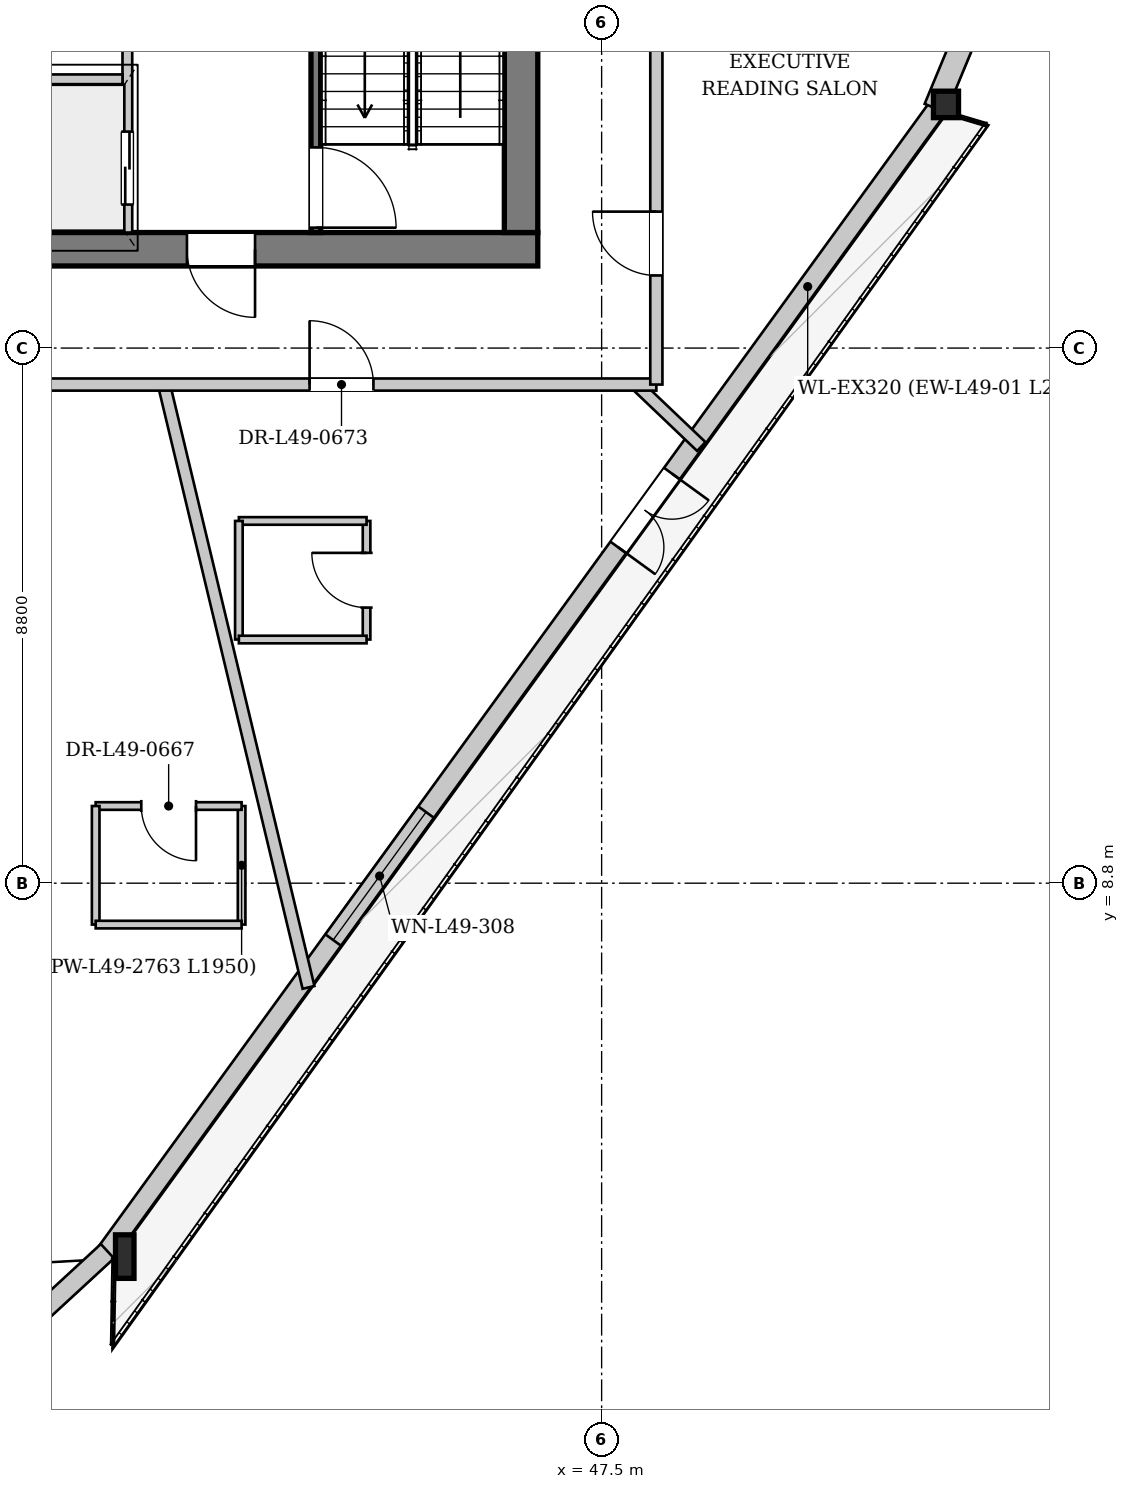
"""IFC4 building model, lengths in metres.
Left out: names, types, materials, properties, quantities, classifications, styles, units other than length and angle.
Written with IfcOpenShell. Run it as: python <this file> out.ifc"""

import sys

from ifc_helpers import new_model, si_unit, direction, frame, frame_2d, origin, origin_2d, place, context, subcontext, project, spatial, rectangle, i_section, extrude, source, transform, mapped, element, fill, save


model = new_model("IFC4")
c1 = context("Model", 3, precision=1e-05, world=origin(), true_north=direction((0.0, 1.0)))
c2 = subcontext(c1, "Body", "Model", "MODEL_VIEW")
j1 = project(units=[si_unit("LENGTHUNIT", "METRE"), si_unit("PLANEANGLEUNIT", "RADIAN")], contexts=[c1])
p1 = place(None, origin())
s1 = spatial("IfcSite", under=j1, at=p1, CompositionType="ELEMENT")
p2 = place(p1, origin())
s2 = spatial("IfcBuilding", under=s1, at=p2, CompositionType="ELEMENT")
p3 = place(p2, frame((0.0, 0.0, 185.65)))
s3 = spatial("IfcBuildingStorey", under=s2, at=p3, CompositionType="ELEMENT", Elevation=185.65)
m1 = source(origin(), c2, "Body", "SweptSolid", [
    extrude(i_section(OverallWidth=0.304, OverallDepth=0.716, WebThickness=0.021, FlangeThickness=0.04, at=origin_2d()), origin(), (0.0, 0.0, 1.0), 3.404),
])
p4 = place(p3, frame((39.48, 2.63, 0.0), z_axis=(0.103926658279, 0.016998356116, 0.994439694294), x_axis=(-0.161416205557, 0.986886421319, 0.0)))
e1 = element("IfcColumn", 1, at=p4, inside=s3, PredefinedType="COLUMN", context=c2, shape_type="MappedRepresentation", body=[
    mapped(m1, transform((0.0, 0.0, 0.0), x_axis=(1.0, 0.0, 0.0), y_axis=(0.0, 1.0, 0.0), z_axis=(0.0, 0.0, 1.0), scale=1.0)),
])
m2 = source(origin(), c2, "Body", "SweptSolid", [
    extrude(i_section(OverallWidth=0.412, OverallDepth=0.435, WebThickness=0.031, FlangeThickness=0.05, at=origin_2d()), origin(), (0.0, 0.0, 1.0), 3.396),
])
p5 = place(p3, frame((53.164, 21.471, 0.0), z_axis=(0.0, 0.080230966511, 0.996776299885), x_axis=(-1.0, 0.0, 0.0)))
e2 = element("IfcColumn", 2, at=p5, inside=s3, PredefinedType="COLUMN", context=c2, shape_type="MappedRepresentation", body=[
    mapped(m2, transform((0.0, 0.0, 0.0), x_axis=(1.0, 0.0, 0.0), y_axis=(0.0, 1.0, 0.0), z_axis=(0.0, 0.0, 1.0), scale=1.0)),
])
p6 = place(p3, frame((53.034, 21.565, 0.0), z_axis=(0.0, 0.0, 1.0), x_axis=(-0.58764790483, -0.809116765337, 0.0)))
e3 = element("IfcWall", 3, at=p6, inside=s3, PredefinedType="SOLIDWALL", context=c2, shape_type="SweptSolid", body=[
    extrude(rectangle(XDim=23.285, YDim=0.32, at=frame_2d((11.643, 0.0))), origin(), (0.0, 0.0, 1.0), 2.722),
])
p7 = place(p6, frame((7.451, 0.0, 0.0)))
e4 = element("IfcOpeningElement", 4, at=p7, cuts=e3, PredefinedType="OPENING", context=c2, shape_type="SweptSolid", body=[
    extrude(rectangle(XDim=1.5, YDim=2.3, at=frame_2d((0.75, 1.15))), frame((0.0, 0.17, 0.0), z_axis=(0.0, -1.0, 0.0), x_axis=(1.0, 0.0, 0.0)), (0.0, 0.0, 1.0), 0.34),
])
p8 = place(p6, frame((14.331, 0.0, 0.252)))
e5 = element("IfcOpeningElement", 5, at=p8, cuts=e3, PredefinedType="OPENING", context=c2, shape_type="SweptSolid", body=[
    extrude(rectangle(XDim=2.6, YDim=2.35, at=frame_2d((1.3, 1.175))), frame((0.0, 0.17, 0.0), z_axis=(0.0, -1.0, 0.0), x_axis=(1.0, 0.0, 0.0)), (0.0, 0.0, 1.0), 0.34),
])
p9 = place(p3, frame((39.372, 2.748, 0.0), z_axis=(0.0, 0.0, 1.0), x_axis=(-0.735229650834, -0.677818088084, 0.0)))
e6 = element("IfcWall", 6, at=p9, inside=s3, PredefinedType="SOLIDWALL", context=c2, shape_type="SweptSolid", body=[
    extrude(rectangle(XDim=2.7, YDim=0.32, at=frame_2d((1.35, 0.0))), origin(), (0.0, 0.0, 1.0), 2.722),
])
p10 = place(p3, frame((61.903, 43.055, 0.0), z_axis=(0.0, 0.0, 1.0), x_axis=(-0.382868163496, -0.923802992732, 0.0)))
e7 = element("IfcWall", 7, at=p10, inside=s3, PredefinedType="SOLIDWALL", context=c2, shape_type="SweptSolid", body=[
    extrude(rectangle(XDim=23.285, YDim=0.38, at=frame_2d((11.643, 0.0))), origin(), (0.0, 0.0, 1.0), 2.722),
])
p11 = place(p10, frame((5.42, 0.0, 0.352)))
e8 = element("IfcOpeningElement", 8, at=p11, cuts=e7, PredefinedType="OPENING", context=c2, shape_type="SweptSolid", body=[
    extrude(rectangle(XDim=2.2, YDim=2.25, at=frame_2d((1.1, 1.125))), frame((0.0, 0.2, 0.0), z_axis=(0.0, -1.0, 0.0), x_axis=(1.0, 0.0, 0.0)), (0.0, 0.0, 1.0), 0.4),
])
p12 = place(p10, frame((15.665, 0.0, 0.352)))
e9 = element("IfcOpeningElement", 9, at=p12, cuts=e7, PredefinedType="OPENING", context=c2, shape_type="SweptSolid", body=[
    extrude(rectangle(XDim=2.2, YDim=2.25, at=frame_2d((1.1, 1.125))), frame((0.0, 0.2, 0.0), z_axis=(0.0, -1.0, 0.0), x_axis=(1.0, 0.0, 0.0)), (0.0, 0.0, 1.0), 0.4),
])
p13 = place(p3, frame((46.45, 19.225, 0.0), z_axis=(0.0, 0.0, 1.0), x_axis=(-1.0, 0.0, 0.0)))
e10 = element("IfcWall", 10, at=p13, inside=s3, PredefinedType="SHEAR", context=c2, shape_type="SweptSolid", body=[
    extrude(rectangle(XDim=16.9, YDim=0.55, at=frame_2d((8.45, 0.0))), origin(), (0.0, 0.0, 1.0), 3.33),
])
p14 = place(p13, frame((4.65, 0.0, 0.0)))
e11 = element("IfcOpeningElement", 11, at=p14, cuts=e10, PredefinedType="OPENING", context=c2, shape_type="SweptSolid", body=[
    extrude(rectangle(XDim=1.12, YDim=2.25, at=frame_2d((0.56, 1.125))), frame((0.0, 0.285, 0.0), z_axis=(0.0, -1.0, 0.0), x_axis=(1.0, 0.0, 0.0)), (0.0, 0.0, 1.0), 0.57),
])
p15 = place(p13, frame((11.15, 0.0, 0.0)))
e12 = element("IfcOpeningElement", 12, at=p15, cuts=e10, PredefinedType="OPENING", context=c2, shape_type="SweptSolid", body=[
    extrude(rectangle(XDim=1.12, YDim=2.25, at=frame_2d((0.56, 1.125))), frame((0.0, 0.285, 0.0), z_axis=(0.0, -1.0, 0.0), x_axis=(1.0, 0.0, 0.0)), (0.0, 0.0, 1.0), 0.57),
])
p16 = place(p3, frame((46.175, 33.7, 0.0), z_axis=(0.0, 0.0, 1.0), x_axis=(0.0, -1.0, 0.0)))
e13 = element("IfcWall", 13, at=p16, inside=s3, PredefinedType="SHEAR", context=c2, shape_type="SweptSolid", body=[
    extrude(rectangle(XDim=14.2, YDim=0.55, at=frame_2d((7.1, 0.0))), origin(), (0.0, 0.0, 1.0), 3.33),
])
p17 = place(p16, frame((5.18, 0.0, 0.0)))
e14 = element("IfcOpeningElement", 14, at=p17, cuts=e13, PredefinedType="OPENING", context=c2, shape_type="SweptSolid", body=[
    extrude(rectangle(XDim=1.6, YDim=2.2, at=frame_2d((0.8, 1.1))), frame((0.0, 0.285, 0.0), z_axis=(0.0, -1.0, 0.0), x_axis=(1.0, 0.0, 0.0)), (0.0, 0.0, 1.0), 0.57),
])
p18 = place(p16, frame((2.05, 0.0, 0.0)))
e15 = element("IfcOpeningElement", 15, at=p18, cuts=e13, PredefinedType="OPENING", context=c2, shape_type="SweptSolid", body=[
    extrude(rectangle(XDim=0.95, YDim=2.1, at=frame_2d((0.475, 1.05))), frame((0.0, 0.285, 0.0), z_axis=(0.0, -1.0, 0.0), x_axis=(1.0, 0.0, 0.0)), (0.0, 0.0, 1.0), 0.57),
])
p19 = place(p3, frame((42.8, 26.96, 0.0), z_axis=(0.0, 0.0, 1.0), x_axis=(0.0, -1.0, 0.0)))
e16 = element("IfcWall", 16, at=p19, inside=s3, PredefinedType="PARTITIONING", context=c2, shape_type="SweptSolid", body=[
    extrude(rectangle(XDim=7.46, YDim=0.16, at=frame_2d((3.73, 0.0))), origin(), (0.0, 0.0, 1.0), 3.33),
])
p20 = place(p19, frame((6.06, 0.0, 0.0)))
e17 = element("IfcOpeningElement", 17, at=p20, cuts=e16, PredefinedType="OPENING", context=c2, shape_type="SweptSolid", body=[
    extrude(rectangle(XDim=1.32, YDim=2.2, at=frame_2d((0.66, 1.1))), frame((0.0, 0.09, 0.0), z_axis=(0.0, -1.0, 0.0), x_axis=(1.0, 0.0, 0.0)), (0.0, 0.0, 1.0), 0.18),
])
p21 = place(p3, frame((39.7, 24.28, 0.0), z_axis=(0.0, 0.0, 1.0), x_axis=(0.0, -1.0, 0.0)))
e18 = element("IfcWall", 18, at=p21, inside=s3, PredefinedType="PARTITIONING", context=c2, shape_type="SweptSolid", body=[
    extrude(rectangle(XDim=4.78, YDim=0.16, at=frame_2d((2.39, 0.0))), origin(), (0.0, 0.0, 1.0), 3.33),
])
p22 = place(p21, frame((3.12, 0.0, 0.0)))
e19 = element("IfcOpeningElement", 19, at=p22, cuts=e18, PredefinedType="OPENING", context=c2, shape_type="SweptSolid", body=[
    extrude(rectangle(XDim=1.2, YDim=2.2, at=frame_2d((0.6, 1.1))), frame((0.0, 0.09, 0.0), z_axis=(0.0, -1.0, 0.0), x_axis=(1.0, 0.0, 0.0)), (0.0, 0.0, 1.0), 0.18),
])
p23 = place(p3, frame((36.38, 22.02, 0.0), z_axis=(0.0, 0.0, 1.0), x_axis=(1.0, 0.0, 0.0)))
e20 = element("IfcWall", 20, at=p23, inside=s3, PredefinedType="PARTITIONING", context=c2, shape_type="SweptSolid", body=[
    extrude(rectangle(XDim=3.24, YDim=0.16, at=frame_2d((1.62, 0.0))), origin(), (0.0, 0.0, 1.0), 3.33),
])
p24 = place(p3, frame((40.302, 17.0, 0.0), z_axis=(0.0, 0.0, 1.0), x_axis=(0.233176404648, -0.972434452452, 0.0)))
e21 = element("IfcWall", 21, at=p24, inside=s3, PredefinedType="PARTITIONING", context=c2, shape_type="SweptSolid", body=[
    extrude(rectangle(XDim=10.195, YDim=0.2, at=frame_2d((5.097, 0.0))), origin(), (0.0, 0.0, 1.0), 3.33),
])
p25 = place(p3, frame((48.07, 17.0, 0.0), z_axis=(0.0, 0.0, 1.0), x_axis=(0.723764420098, -0.69004714636, 0.0)))
e22 = element("IfcWall", 22, at=p25, inside=s3, PredefinedType="PARTITIONING", context=c2, shape_type="SweptSolid", body=[
    extrude(rectangle(XDim=1.477, YDim=0.2, at=frame_2d((0.739, 0.0))), origin(), (0.0, 0.0, 1.0), 3.33),
])
p26 = place(p3, frame((41.579, 8.119, 0.0), z_axis=(0.0, 0.0, 1.0), x_axis=(0.0, 1.0, 0.0)))
e23 = element("IfcWall", 23, at=p26, inside=s3, PredefinedType="PARTITIONING", context=c2, shape_type="SweptSolid", body=[
    extrude(rectangle(XDim=1.95, YDim=0.125, at=frame_2d((0.975, 0.0))), origin(), (0.0, 0.0, 1.0), 3.33),
])
p27 = place(p3, frame((41.579, 10.069, 0.0), z_axis=(0.0, 0.0, 1.0), x_axis=(-1.0, 0.0, 0.0)))
e24 = element("IfcWall", 24, at=p27, inside=s3, PredefinedType="PARTITIONING", context=c2, shape_type="SweptSolid", body=[
    extrude(rectangle(XDim=2.4, YDim=0.125, at=frame_2d((1.2, 0.0))), origin(), (0.0, 0.0, 1.0), 3.33),
])
p28 = place(p27, frame((0.75, 0.0, 0.0)))
e25 = element("IfcOpeningElement", 25, at=p28, cuts=e24, PredefinedType="OPENING", context=c2, shape_type="SweptSolid", body=[
    extrude(rectangle(XDim=0.9, YDim=2.1, at=frame_2d((0.45, 1.05))), frame((0.0, 0.073, 0.0), z_axis=(0.0, -1.0, 0.0), x_axis=(1.0, 0.0, 0.0)), (0.0, 0.0, 1.0), 0.145),
])
p29 = place(p3, frame((39.179, 10.069, 0.0), z_axis=(0.0, 0.0, 1.0), x_axis=(0.0, -1.0, 0.0)))
e26 = element("IfcWall", 26, at=p29, inside=s3, PredefinedType="PARTITIONING", context=c2, shape_type="SweptSolid", body=[
    extrude(rectangle(XDim=1.95, YDim=0.125, at=frame_2d((0.975, 0.0))), origin(), (0.0, 0.0, 1.0), 3.005),
])
p30 = place(p3, frame((39.179, 8.119, 0.0), z_axis=(0.0, 0.0, 1.0), x_axis=(1.0, 0.0, 0.0)))
e27 = element("IfcWall", 27, at=p30, inside=s3, PredefinedType="PARTITIONING", context=c2, shape_type="SweptSolid", body=[
    extrude(rectangle(XDim=2.4, YDim=0.125, at=frame_2d((1.2, 0.0))), origin(), (0.0, 0.0, 1.0), 3.33),
])
p31 = place(p3, frame((43.634, 12.807, 0.0), z_axis=(0.0, 0.0, 1.0), x_axis=(0.0, 1.0, 0.0)))
e28 = element("IfcWall", 28, at=p31, inside=s3, PredefinedType="PARTITIONING", context=c2, shape_type="SweptSolid", body=[
    extrude(rectangle(XDim=1.95, YDim=0.125, at=frame_2d((0.975, 0.0))), origin(), (0.0, 0.0, 1.0), 3.33),
])
p32 = place(p31, frame((0.525, 0.0, 0.0)))
e29 = element("IfcOpeningElement", 29, at=p32, cuts=e28, PredefinedType="OPENING", context=c2, shape_type="SweptSolid", body=[
    extrude(rectangle(XDim=0.9, YDim=2.1, at=frame_2d((0.45, 1.05))), frame((0.0, 0.073, 0.0), z_axis=(0.0, -1.0, 0.0), x_axis=(1.0, 0.0, 0.0)), (0.0, 0.0, 1.0), 0.145),
])
p33 = place(p3, frame((43.634, 14.757, 0.0), z_axis=(0.0, 0.0, 1.0), x_axis=(-1.0, 0.0, 0.0)))
e30 = element("IfcWall", 30, at=p33, inside=s3, PredefinedType="PARTITIONING", context=c2, shape_type="SweptSolid", body=[
    extrude(rectangle(XDim=2.1, YDim=0.125, at=frame_2d((1.05, 0.0))), origin(), (0.0, 0.0, 1.0), 3.33),
])
p34 = place(p3, frame((41.534, 14.757, 0.0), z_axis=(0.0, 0.0, 1.0), x_axis=(0.0, -1.0, 0.0)))
e31 = element("IfcWall", 31, at=p34, inside=s3, PredefinedType="PARTITIONING", context=c2, shape_type="SweptSolid", body=[
    extrude(rectangle(XDim=1.95, YDim=0.125, at=frame_2d((0.975, 0.0))), origin(), (0.0, 0.0, 1.0), 3.33),
])
p35 = place(p3, frame((41.534, 12.807, 0.0), z_axis=(0.0, 0.0, 1.0), x_axis=(1.0, 0.0, 0.0)))
e32 = element("IfcWall", 32, at=p35, inside=s3, PredefinedType="PARTITIONING", context=c2, shape_type="SweptSolid", body=[
    extrude(rectangle(XDim=2.1, YDim=0.125, at=frame_2d((1.05, 0.0))), origin(), (0.0, 0.0, 1.0), 3.33),
])
p36 = place(p3, frame((27.6, 17.0, 0.0), z_axis=(0.0, 0.0, 1.0), x_axis=(1.0, 0.0, 0.0)))
e33 = element("IfcWall", 33, at=p36, inside=s3, PredefinedType="PARTITIONING", context=c2, shape_type="SweptSolid", body=[
    extrude(rectangle(XDim=20.8, YDim=0.2, at=frame_2d((10.4, 0.0))), origin(), (0.0, 0.0, 1.0), 3.33),
])
p37 = place(p36, frame((8.292, 0.0, 0.0)))
e34 = element("IfcOpeningElement", 34, at=p37, cuts=e33, PredefinedType="OPENING", context=c2, shape_type="SweptSolid", body=[
    extrude(rectangle(XDim=1.05, YDim=2.2, at=frame_2d((0.525, 1.1))), frame((0.0, 0.11, 0.0), z_axis=(0.0, -1.0, 0.0), x_axis=(1.0, 0.0, 0.0)), (0.0, 0.0, 1.0), 0.22),
])
p38 = place(p36, frame((15.097, 0.0, 0.0)))
e35 = element("IfcOpeningElement", 35, at=p38, cuts=e33, PredefinedType="OPENING", context=c2, shape_type="SweptSolid", body=[
    extrude(rectangle(XDim=1.05, YDim=2.2, at=frame_2d((0.525, 1.1))), frame((0.0, 0.11, 0.0), z_axis=(0.0, -1.0, 0.0), x_axis=(1.0, 0.0, 0.0)), (0.0, 0.0, 1.0), 0.22),
])
p39 = place(p36, frame((1.25, 0.0, 0.0)))
e36 = element("IfcOpeningElement", 36, at=p39, cuts=e33, PredefinedType="OPENING", context=c2, shape_type="SweptSolid", body=[
    extrude(rectangle(XDim=1.05, YDim=2.2, at=frame_2d((0.525, 1.1))), frame((0.0, 0.11, 0.0), z_axis=(0.0, -1.0, 0.0), x_axis=(1.0, 0.0, 0.0)), (0.0, 0.0, 1.0), 0.22),
])
p40 = place(p3, frame((48.4, 17.0, 0.0), z_axis=(0.0, 0.0, 1.0), x_axis=(0.0, 1.0, 0.0)))
e37 = element("IfcWall", 37, at=p40, inside=s3, PredefinedType="PARTITIONING", context=c2, shape_type="SweptSolid", body=[
    extrude(rectangle(XDim=19.2, YDim=0.2, at=frame_2d((9.6, 0.0))), origin(), (0.0, 0.0, 1.0), 3.33),
])
p41 = place(p40, frame((1.794, 0.0, 0.0)))
e38 = element("IfcOpeningElement", 38, at=p41, cuts=e37, PredefinedType="OPENING", context=c2, shape_type="SweptSolid", body=[
    extrude(rectangle(XDim=1.05, YDim=2.2, at=frame_2d((0.525, 1.1))), frame((0.0, 0.11, 0.0), z_axis=(0.0, -1.0, 0.0), x_axis=(1.0, 0.0, 0.0)), (0.0, 0.0, 1.0), 0.22),
])
p42 = place(p40, frame((9.465, 0.0, 0.0)))
e39 = element("IfcOpeningElement", 39, at=p42, cuts=e37, PredefinedType="OPENING", context=c2, shape_type="SweptSolid", body=[
    extrude(rectangle(XDim=1.05, YDim=2.2, at=frame_2d((0.525, 1.1))), frame((0.0, 0.11, 0.0), z_axis=(0.0, -1.0, 0.0), x_axis=(1.0, 0.0, 0.0)), (0.0, 0.0, 1.0), 0.22),
])
m3 = source(origin(), c2, "Body", "SweptSolid", [
    extrude(rectangle(XDim=1.5, YDim=2.3, at=frame_2d((0.75, 1.15))), frame((0.0, 0.025, 0.0), z_axis=(0.0, -1.0, 0.0), x_axis=(1.0, 0.0, 0.0)), (0.0, 0.0, 1.0), 0.05),
])
p43 = place(p7, origin())
e40 = element("IfcDoor", 40, at=p43, inside=s3, OperationType="DOUBLE_DOOR_SINGLE_SWING", PredefinedType="DOOR", context=c2, shape_type="MappedRepresentation", body=[
    mapped(m3, transform((0.0, 0.0, 0.0), x_axis=(1.0, 0.0, 0.0), y_axis=(0.0, 1.0, 0.0), z_axis=(0.0, 0.0, 1.0), scale=1.0)),
])
fill(e4, e40)
m4 = source(origin(), c2, "Body", "SweptSolid", [
    extrude(rectangle(XDim=2.6, YDim=2.35, at=frame_2d((1.3, 1.175))), frame((0.0, 0.03, 0.0), z_axis=(0.0, -1.0, 0.0), x_axis=(1.0, 0.0, 0.0)), (0.0, 0.0, 1.0), 0.06),
])
p44 = place(p8, origin())
e41 = element("IfcWindow", 41, at=p44, inside=s3, PartitioningType="SINGLE_PANEL", PredefinedType="WINDOW", context=c2, shape_type="MappedRepresentation", body=[
    mapped(m4, transform((0.0, 0.0, 0.0), x_axis=(1.0, 0.0, 0.0), y_axis=(0.0, 1.0, 0.0), z_axis=(0.0, 0.0, 1.0), scale=1.0)),
])
fill(e5, e41)
m5 = source(origin(), c2, "Body", "SweptSolid", [
    extrude(rectangle(XDim=1.12, YDim=2.25, at=frame_2d((0.56, 1.125))), frame((0.0, 0.025, 0.0), z_axis=(0.0, -1.0, 0.0), x_axis=(1.0, 0.0, 0.0)), (0.0, 0.0, 1.0), 0.05),
])
p45 = place(p14, origin())
e42 = element("IfcDoor", 42, at=p45, inside=s3, OperationType="SINGLE_SWING_LEFT", PredefinedType="DOOR", context=c2, shape_type="MappedRepresentation", body=[
    mapped(m5, transform((0.0, 0.0, 0.0), x_axis=(1.0, 0.0, 0.0), y_axis=(0.0, 1.0, 0.0), z_axis=(0.0, 0.0, 1.0), scale=1.0)),
])
fill(e11, e42)
m6 = source(origin(), c2, "Body", "SweptSolid", [
    extrude(rectangle(XDim=1.32, YDim=2.2, at=frame_2d((0.66, 1.1))), frame((0.0, 0.025, 0.0), z_axis=(0.0, -1.0, 0.0), x_axis=(1.0, 0.0, 0.0)), (0.0, 0.0, 1.0), 0.05),
])
p46 = place(p20, origin())
e43 = element("IfcDoor", 43, at=p46, inside=s3, OperationType="SINGLE_SWING_RIGHT", PredefinedType="DOOR", context=c2, shape_type="MappedRepresentation", body=[
    mapped(m6, transform((0.0, 0.0, 0.0), x_axis=(1.0, 0.0, 0.0), y_axis=(0.0, 1.0, 0.0), z_axis=(0.0, 0.0, 1.0), scale=1.0)),
])
fill(e17, e43)
m7 = source(origin(), c2, "Body", "SweptSolid", [
    extrude(rectangle(XDim=1.2, YDim=2.2, at=frame_2d((0.6, 1.1))), frame((0.0, 0.025, 0.0), z_axis=(0.0, -1.0, 0.0), x_axis=(1.0, 0.0, 0.0)), (0.0, 0.0, 1.0), 0.05),
])
p47 = place(p22, origin())
e44 = element("IfcDoor", 44, at=p47, inside=s3, OperationType="DOUBLE_DOOR_SLIDING", PredefinedType="DOOR", context=c2, shape_type="MappedRepresentation", body=[
    mapped(m7, transform((0.0, 0.0, 0.0), x_axis=(1.0, 0.0, 0.0), y_axis=(0.0, 1.0, 0.0), z_axis=(0.0, 0.0, 1.0), scale=1.0)),
])
fill(e19, e44)
m8 = source(origin(), c2, "Body", "SweptSolid", [
    extrude(rectangle(XDim=0.9, YDim=2.1, at=frame_2d((0.45, 1.05))), frame((0.0, 0.025, 0.0), z_axis=(0.0, -1.0, 0.0), x_axis=(1.0, 0.0, 0.0)), (0.0, 0.0, 1.0), 0.05),
])
p48 = place(p28, origin())
e45 = element("IfcDoor", 45, at=p48, inside=s3, OperationType="SINGLE_SWING_LEFT", PredefinedType="DOOR", context=c2, shape_type="MappedRepresentation", body=[
    mapped(m8, transform((0.0, 0.0, 0.0), x_axis=(1.0, 0.0, 0.0), y_axis=(0.0, 1.0, 0.0), z_axis=(0.0, 0.0, 1.0), scale=1.0)),
])
fill(e25, e45)
p49 = place(p32, origin())
e46 = element("IfcDoor", 46, at=p49, inside=s3, OperationType="SINGLE_SWING_RIGHT", PredefinedType="DOOR", context=c2, shape_type="MappedRepresentation", body=[
    mapped(m8, transform((0.0, 0.0, 0.0), x_axis=(1.0, 0.0, 0.0), y_axis=(0.0, 1.0, 0.0), z_axis=(0.0, 0.0, 1.0), scale=1.0)),
])
fill(e29, e46)
m9 = source(origin(), c2, "Body", "SweptSolid", [
    extrude(rectangle(XDim=1.05, YDim=2.2, at=frame_2d((0.525, 1.1))), frame((0.0, 0.025, 0.0), z_axis=(0.0, -1.0, 0.0), x_axis=(1.0, 0.0, 0.0)), (0.0, 0.0, 1.0), 0.05),
])
p50 = place(p38, origin())
e47 = element("IfcDoor", 47, at=p50, inside=s3, OperationType="SINGLE_SWING_LEFT", PredefinedType="DOOR", context=c2, shape_type="MappedRepresentation", body=[
    mapped(m9, transform((0.0, 0.0, 0.0), x_axis=(1.0, 0.0, 0.0), y_axis=(0.0, 1.0, 0.0), z_axis=(0.0, 0.0, 1.0), scale=1.0)),
])
fill(e35, e47)
p51 = place(p41, origin())
e48 = element("IfcDoor", 48, at=p51, inside=s3, OperationType="SINGLE_SWING_RIGHT", PredefinedType="DOOR", context=c2, shape_type="MappedRepresentation", body=[
    mapped(m9, transform((0.0, 0.0, 0.0), x_axis=(1.0, 0.0, 0.0), y_axis=(0.0, 1.0, 0.0), z_axis=(0.0, 0.0, 1.0), scale=1.0)),
])
fill(e38, e48)
save(model, sys.argv[1])
